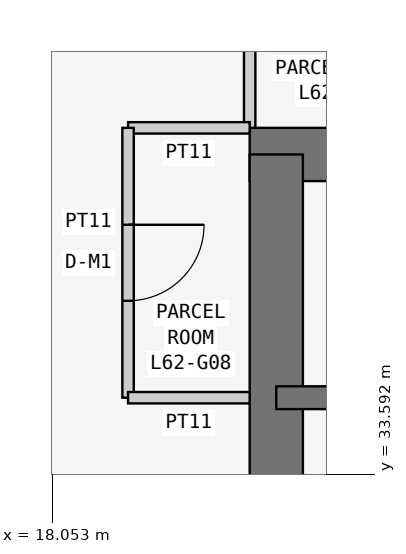
"""IFC4 building model, lengths in metres.
Left out: names, types, materials, properties, quantities, classifications, styles, units other than length and angle.
Written with IfcOpenShell. Run it as: python <this file> out.ifc"""

import sys

from ifc_helpers import new_model, si_unit, direction, frame, frame_2d, origin, place, context, subcontext, project, spatial, rectangle, extrude, element, fill, save


model = new_model("IFC4")
c1 = context("Model", 3, precision=1e-05, world=origin(), true_north=direction((0.0, 1.0)))
c2 = subcontext(c1, "Body", "Model", "MODEL_VIEW")
j1 = project(units=[si_unit("LENGTHUNIT", "METRE"), si_unit("PLANEANGLEUNIT", "RADIAN")], contexts=[c1])
p1 = place(None, origin())
s1 = spatial("IfcSite", under=j1, at=p1, CompositionType="ELEMENT")
p2 = place(p1, origin())
s2 = spatial("IfcBuilding", under=s1, at=p2, CompositionType="ELEMENT")
p3 = place(p2, frame((0.0, 0.0, 237.3)))
s3 = spatial("IfcBuildingStorey", under=s2, at=p3, CompositionType="ELEMENT", Elevation=237.3)
p4 = place(p3, frame((37.8, 37.8, 0.0), z_axis=(0.0, 0.0, 1.0), x_axis=(-1.0, 0.0, 0.0)))
e1 = element("IfcWall", 1, at=p4, inside=s3, PredefinedType="SHEAR", context=c2, shape_type="SweptSolid", body=[
    extrude(rectangle(XDim=17.15, YDim=0.7, at=frame_2d((8.575, 0.0))), origin(), (0.0, 0.0, 1.0), 3.6),
])
p5 = place(p3, frame((21.0, 37.8, 0.0), z_axis=(0.0, 0.0, 1.0), x_axis=(0.0, -1.0, 0.0)))
e2 = element("IfcWall", 2, at=p5, inside=s3, PredefinedType="SHEAR", context=c2, shape_type="SweptSolid", body=[
    extrude(rectangle(XDim=17.15, YDim=0.7, at=frame_2d((8.575, 0.0))), origin(), (0.0, 0.0, 1.0), 3.6),
])
p6 = place(p5, frame((5.4, 0.0, 0.0)))
e3 = element("IfcOpeningElement", 3, at=p6, cuts=e2, PredefinedType="OPENING", context=c2, shape_type="SweptSolid", body=[
    extrude(rectangle(XDim=1.2, YDim=2.1, at=frame_2d((0.6, 1.05))), frame((0.0, 0.36, 0.0), z_axis=(0.0, -1.0, 0.0), x_axis=(1.0, 0.0, 0.0)), (0.0, 0.0, 1.0), 0.72),
])
p7 = place(p3, frame((21.0, 34.6, 0.0), z_axis=(0.0, 0.0, 1.0), x_axis=(1.0, 0.0, 0.0)))
e4 = element("IfcWall", 4, at=p7, inside=s3, PredefinedType="SHEAR", context=c2, shape_type="SweptSolid", body=[
    extrude(rectangle(XDim=11.2, YDim=0.3, at=frame_2d((5.6, 0.0))), origin(), (0.0, 0.0, 1.0), 3.6),
])
p8 = place(p7, frame((9.25, 0.0, 0.0)))
e5 = element("IfcOpeningElement", 5, at=p8, cuts=e4, PredefinedType="OPENING", context=c2, shape_type="SweptSolid", body=[
    extrude(rectangle(XDim=1.1, YDim=2.1, at=frame_2d((0.55, 1.05))), frame((0.0, 0.16, 0.0), z_axis=(0.0, -1.0, 0.0), x_axis=(1.0, 0.0, 0.0)), (0.0, 0.0, 1.0), 0.32),
])
p9 = place(p7, frame((1.0, 0.0, 0.0)))
e6 = element("IfcOpeningElement", 6, at=p9, cuts=e4, PredefinedType="OPENING", context=c2, shape_type="SweptSolid", body=[
    extrude(rectangle(XDim=1.1, YDim=2.1, at=frame_2d((0.55, 1.05))), frame((0.0, 0.16, 0.0), z_axis=(0.0, -1.0, 0.0), x_axis=(1.0, 0.0, 0.0)), (0.0, 0.0, 1.0), 0.32),
])
p10 = place(p7, frame((3.65, 0.0, 0.0)))
e7 = element("IfcOpeningElement", 7, at=p10, cuts=e4, PredefinedType="OPENING", context=c2, shape_type="SweptSolid", body=[
    extrude(rectangle(XDim=1.1, YDim=2.1, at=frame_2d((0.55, 1.05))), frame((0.0, 0.16, 0.0), z_axis=(0.0, -1.0, 0.0), x_axis=(1.0, 0.0, 0.0)), (0.0, 0.0, 1.0), 0.32),
])
p11 = place(p7, frame((6.35, 0.0, 0.0)))
e8 = element("IfcOpeningElement", 8, at=p11, cuts=e4, PredefinedType="OPENING", context=c2, shape_type="SweptSolid", body=[
    extrude(rectangle(XDim=1.3, YDim=2.1, at=frame_2d((0.65, 1.05))), frame((0.0, 0.16, 0.0), z_axis=(0.0, -1.0, 0.0), x_axis=(1.0, 0.0, 0.0)), (0.0, 0.0, 1.0), 0.32),
])
p12 = place(p3, frame((20.65, 40.6, 0.0), z_axis=(0.0, 0.0, 1.0), x_axis=(0.0, -1.0, 0.0)))
e9 = element("IfcWall", 9, at=p12, inside=s3, PredefinedType="PARTITIONING", context=c2, shape_type="SweptSolid", body=[
    extrude(rectangle(XDim=2.45, YDim=0.15, at=frame_2d((1.225, 0.0))), origin(), (0.0, 0.0, 1.0), 3.45),
])
p13 = place(p3, frame((20.65, 38.15, 0.0), z_axis=(0.0, 0.0, 1.0), x_axis=(-1.0, 0.0, 0.0)))
e10 = element("IfcWall", 10, at=p13, inside=s3, PredefinedType="PARTITIONING", context=c2, shape_type="SweptSolid", body=[
    extrude(rectangle(XDim=1.6, YDim=0.15, at=frame_2d((0.8, 0.0))), origin(), (0.0, 0.0, 1.0), 3.45),
])
p14 = place(p3, frame((19.05, 38.15, 0.0), z_axis=(0.0, 0.0, 1.0), x_axis=(0.0, -1.0, 0.0)))
e11 = element("IfcWall", 11, at=p14, inside=s3, PredefinedType="PARTITIONING", context=c2, shape_type="SweptSolid", body=[
    extrude(rectangle(XDim=3.55, YDim=0.15, at=frame_2d((1.775, 0.0))), origin(), (0.0, 0.0, 1.0), 3.45),
])
p15 = place(p14, frame((1.275, 0.0, 0.0)))
e12 = element("IfcOpeningElement", 12, at=p15, cuts=e11, PredefinedType="OPENING", context=c2, shape_type="SweptSolid", body=[
    extrude(rectangle(XDim=1.0, YDim=2.1, at=frame_2d((0.5, 1.05))), frame((0.0, 0.085, 0.0), z_axis=(0.0, -1.0, 0.0), x_axis=(1.0, 0.0, 0.0)), (0.0, 0.0, 1.0), 0.17),
])
p16 = place(p3, frame((19.05, 34.6, 0.0), z_axis=(0.0, 0.0, 1.0), x_axis=(1.0, 0.0, 0.0)))
e13 = element("IfcWall", 13, at=p16, inside=s3, PredefinedType="PARTITIONING", context=c2, shape_type="SweptSolid", body=[
    extrude(rectangle(XDim=1.6, YDim=0.15, at=frame_2d((0.8, 0.0))), origin(), (0.0, 0.0, 1.0), 3.45),
])
p17 = place(p15, origin())
e14 = element("IfcDoor", 14, at=p17, inside=s3, OperationType="SINGLE_SWING_LEFT", PredefinedType="DOOR", context=c2, shape_type="SweptSolid", body=[
    extrude(rectangle(XDim=1.0, YDim=2.1, at=frame_2d((0.5, 1.05))), frame((0.0, 0.025, 0.0), z_axis=(0.0, -1.0, 0.0), x_axis=(1.0, 0.0, 0.0)), (0.0, 0.0, 1.0), 0.05),
])
fill(e12, e14)
save(model, sys.argv[1])
